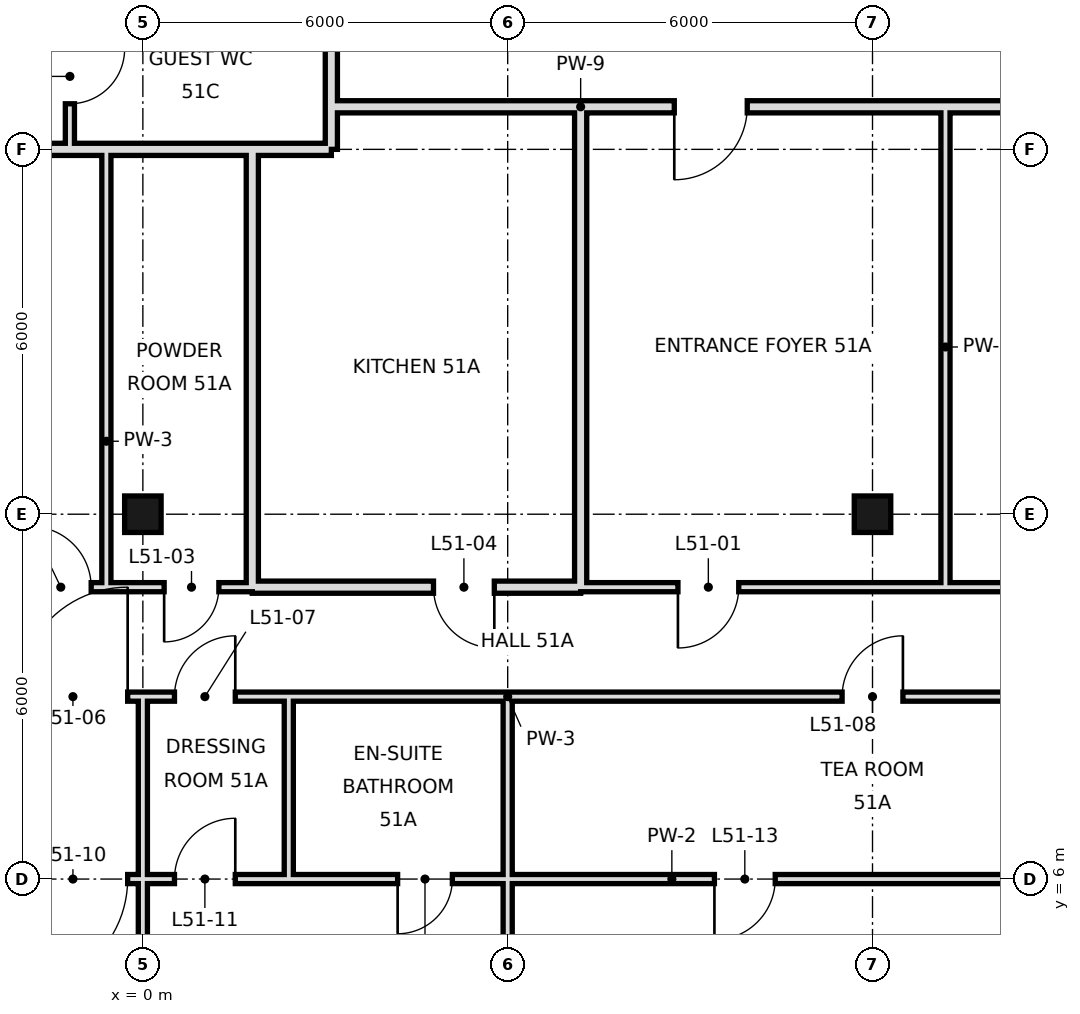
"""IFC4 building model, lengths in metres.
Left out: names, types, materials, properties, quantities, classifications, styles, units other than length and angle.
Written with IfcOpenShell. Run it as: python <this file> out.ifc"""

import sys

from ifc_helpers import new_model, si_unit, direction, frame, frame_2d, origin, origin_2d, place, context, subcontext, project, spatial, rectangle, hollow_rectangle, extrude, element, fill, save


model = new_model("IFC4")
c1 = context("Model", 3, precision=1e-05, world=origin(), true_north=direction((0.0, 1.0)))
c2 = subcontext(c1, "Body", "Model", "MODEL_VIEW")
j1 = project(units=[si_unit("LENGTHUNIT", "METRE"), si_unit("PLANEANGLEUNIT", "RADIAN")], contexts=[c1])
p1 = place(None, origin())
s1 = spatial("IfcSite", under=j1, at=p1, CompositionType="ELEMENT")
p2 = place(p1, origin())
s2 = spatial("IfcBuilding", under=s1, at=p2, CompositionType="ELEMENT")
p3 = place(p2, frame((0.0, 0.0, 219.0)))
s3 = spatial("IfcBuildingStorey", under=s2, at=p3, CompositionType="ELEMENT", Elevation=219.0)
for number, where, z_axis, x_axis in (
    (1, (0.0, 12.0, 0.0), (0.0, 0.0, 1.0), (1.0, 0.0, 0.0)),
    (2, (12.0, 12.0, 0.0), (0.0, 0.0, 1.0), (1.0, 0.0, 0.0)),
):
    element("IfcColumn", number, at=place(p3, frame(where, z_axis=z_axis, x_axis=x_axis)), inside=s3, PredefinedType="COLUMN", context=c2, shape_type="SweptSolid", body=[
        extrude(hollow_rectangle(XDim=0.6, YDim=0.6, WallThickness=0.028, at=origin_2d()), origin(), (0.0, 0.0, 1.0), 3.6),
    ])
p4 = place(p3, frame((-0.6, 10.8, 0.0), z_axis=(0.0, 0.0, 1.0), x_axis=(0.0, 1.0, 0.0)))
e3 = element("IfcWall", 3, at=p4, inside=s3, PredefinedType="PARTITIONING", context=c2, shape_type="SweptSolid", body=[
    extrude(rectangle(XDim=7.2, YDim=0.15, at=frame_2d((3.6, 0.0))), origin(), (0.0, 0.0, 1.0), 3.42),
])
p5 = place(p3, frame((-1.2, 18.0, 0.0), z_axis=(0.0, 0.0, 1.0), x_axis=(0.0, 1.0, 0.0)))
e4 = element("IfcWall", 4, at=p5, inside=s3, PredefinedType="PARTITIONING", context=c2, shape_type="SweptSolid", body=[
    extrude(rectangle(XDim=2.4, YDim=0.15, at=frame_2d((1.2, 0.0))), origin(), (0.0, 0.0, 1.0), 3.42),
])
p6 = place(p5, frame((0.75, 0.0, 0.0)))
e5 = element("IfcOpeningElement", 5, at=p6, cuts=e4, PredefinedType="OPENING", context=c2, shape_type="SweptSolid", body=[
    extrude(rectangle(XDim=0.9, YDim=2.4, at=frame_2d((0.45, 1.2))), frame((0.0, 0.085, 0.0), z_axis=(0.0, -1.0, 0.0), x_axis=(1.0, 0.0, 0.0)), (0.0, 0.0, 1.0), 0.17),
])
p7 = place(p3, frame((0.0, 0.0, 0.0), z_axis=(0.0, 0.0, 1.0), x_axis=(0.0, 1.0, 0.0)))
e6 = element("IfcWall", 6, at=p7, inside=s3, PredefinedType="PARTITIONING", context=c2, shape_type="SweptSolid", body=[
    extrude(rectangle(XDim=9.0, YDim=0.15, at=frame_2d((4.5, 0.0))), origin(), (0.0, 0.0, 1.0), 2.72),
])
p8 = place(p3, frame((1.8, 10.8, 0.0), z_axis=(0.0, 0.0, 1.0), x_axis=(0.0, 1.0, 0.0)))
e7 = element("IfcWall", 7, at=p8, inside=s3, PredefinedType="SOLIDWALL", context=c2, shape_type="SweptSolid", body=[
    extrude(rectangle(XDim=7.2, YDim=0.2, at=frame_2d((3.6, 0.0))), origin(), (0.0, 0.0, 1.0), 3.42),
])
p9 = place(p3, frame((13.2, 10.8, 0.0), z_axis=(0.0, 0.0, 1.0), x_axis=(0.0, 1.0, 0.0)))
e8 = element("IfcWall", 8, at=p9, inside=s3, PredefinedType="PARTITIONING", context=c2, shape_type="SweptSolid", body=[
    extrude(rectangle(XDim=7.9, YDim=0.15, at=frame_2d((3.95, 0.0))), origin(), (0.0, 0.0, 1.0), 3.42),
])
p10 = place(p3, frame((2.4, 6.0, 0.0), z_axis=(0.0, 0.0, 1.0), x_axis=(0.0, 1.0, 0.0)))
e9 = element("IfcWall", 9, at=p10, inside=s3, PredefinedType="PARTITIONING", context=c2, shape_type="SweptSolid", body=[
    extrude(rectangle(XDim=3.0, YDim=0.15, at=frame_2d((1.5, 0.0))), origin(), (0.0, 0.0, 1.0), 3.42),
])
p11 = place(p3, frame((3.1, 18.7, 0.0), z_axis=(0.0, 0.0, 1.0), x_axis=(0.0, 1.0, 0.0)))
e10 = element("IfcWall", 10, at=p11, inside=s3, PredefinedType="SOLIDWALL", context=c2, shape_type="SweptSolid", body=[
    extrude(rectangle(XDim=15.5, YDim=0.2, at=frame_2d((7.75, 0.0))), origin(), (0.0, 0.0, 1.0), 2.97),
])
p12 = place(p11, frame((4.96, 0.0, 0.0)))
e11 = element("IfcOpeningElement", 11, at=p12, cuts=e10, PredefinedType="OPENING", context=c2, shape_type="SweptSolid", body=[
    extrude(rectangle(XDim=1.2, YDim=2.4, at=frame_2d((0.6, 1.2))), frame((0.0, 0.11, 0.0), z_axis=(0.0, -1.0, 0.0), x_axis=(1.0, 0.0, 0.0)), (0.0, 0.0, 1.0), 0.22),
])
p13 = place(p3, frame((3.1, 18.0, 0.0), z_axis=(0.0, 0.0, 1.0), x_axis=(0.0, 1.0, 0.0)))
e12 = element("IfcWall", 12, at=p13, inside=s3, PredefinedType="SOLIDWALL", context=c2, shape_type="SweptSolid", body=[
    extrude(rectangle(XDim=0.7, YDim=0.2, at=frame_2d((0.35, 0.0))), origin(), (0.0, 0.0, 1.0), 2.97),
])
p14 = place(p3, frame((6.0, -0.6, 0.0), z_axis=(0.0, 0.0, 1.0), x_axis=(0.0, 1.0, 0.0)))
e13 = element("IfcWall", 13, at=p14, inside=s3, PredefinedType="PARTITIONING", context=c2, shape_type="SweptSolid", body=[
    extrude(rectangle(XDim=6.6, YDim=0.15, at=frame_2d((3.3, 0.0))), origin(), (0.0, 0.0, 1.0), 2.72),
])
p15 = place(p3, frame((6.0, 6.0, 0.0), z_axis=(0.0, 0.0, 1.0), x_axis=(0.0, 1.0, 0.0)))
e14 = element("IfcWall", 14, at=p15, inside=s3, PredefinedType="PARTITIONING", context=c2, shape_type="SweptSolid", body=[
    extrude(rectangle(XDim=3.0, YDim=0.15, at=frame_2d((1.5, 0.0))), origin(), (0.0, 0.0, 1.0), 2.72),
])
p16 = place(p3, frame((7.2, 10.8, 0.0), z_axis=(0.0, 0.0, 1.0), x_axis=(0.0, 1.0, 0.0)))
e15 = element("IfcWall", 15, at=p16, inside=s3, PredefinedType="SOLIDWALL", context=c2, shape_type="SweptSolid", body=[
    extrude(rectangle(XDim=7.9, YDim=0.2, at=frame_2d((3.95, 0.0))), origin(), (0.0, 0.0, 1.0), 2.72),
])
p17 = place(p3, frame((1.8, 10.8, 0.0), z_axis=(0.0, 0.0, 1.0), x_axis=(1.0, 0.0, 0.0)))
e16 = element("IfcWall", 16, at=p17, inside=s3, PredefinedType="SOLIDWALL", context=c2, shape_type="SweptSolid", body=[
    extrude(rectangle(XDim=5.4, YDim=0.2, at=frame_2d((2.7, 0.0))), origin(), (0.0, 0.0, 1.0), 2.72),
])
p18 = place(p17, frame((2.98, 0.0, 0.0)))
e17 = element("IfcOpeningElement", 17, at=p18, cuts=e16, PredefinedType="OPENING", context=c2, shape_type="SweptSolid", body=[
    extrude(rectangle(XDim=1.0, YDim=2.4, at=frame_2d((0.5, 1.2))), frame((0.0, 0.11, 0.0), z_axis=(0.0, -1.0, 0.0), x_axis=(1.0, 0.0, 0.0)), (0.0, 0.0, 1.0), 0.22),
])
p19 = place(p3, frame((-12.6, 10.8, 0.0), z_axis=(0.0, 0.0, 1.0), x_axis=(1.0, 0.0, 0.0)))
e18 = element("IfcWall", 18, at=p19, inside=s3, PredefinedType="PARTITIONING", context=c2, shape_type="SweptSolid", body=[
    extrude(rectangle(XDim=12.0, YDim=0.15, at=frame_2d((6.0, 0.0))), origin(), (0.0, 0.0, 1.0), 3.42),
])
p20 = place(p19, frame((10.75, 0.0, 0.0)))
e19 = element("IfcOpeningElement", 19, at=p20, cuts=e18, PredefinedType="OPENING", context=c2, shape_type="SweptSolid", body=[
    extrude(rectangle(XDim=1.0, YDim=2.4, at=frame_2d((0.5, 1.2))), frame((0.0, 0.085, 0.0), z_axis=(0.0, -1.0, 0.0), x_axis=(1.0, 0.0, 0.0)), (0.0, 0.0, 1.0), 0.17),
])
p21 = place(p3, frame((7.2, 10.8, 0.0), z_axis=(0.0, 0.0, 1.0), x_axis=(1.0, 0.0, 0.0)))
e20 = element("IfcWall", 20, at=p21, inside=s3, PredefinedType="PARTITIONING", context=c2, shape_type="SweptSolid", body=[
    extrude(rectangle(XDim=24.6, YDim=0.15, at=frame_2d((12.3, 0.0))), origin(), (0.0, 0.0, 1.0), 3.42),
])
p22 = place(p21, frame((1.6, 0.0, 0.0)))
e21 = element("IfcOpeningElement", 21, at=p22, cuts=e20, PredefinedType="OPENING", context=c2, shape_type="SweptSolid", body=[
    extrude(rectangle(XDim=1.0, YDim=2.4, at=frame_2d((0.5, 1.2))), frame((0.0, 0.085, 0.0), z_axis=(0.0, -1.0, 0.0), x_axis=(1.0, 0.0, 0.0)), (0.0, 0.0, 1.0), 0.17),
])
p23 = place(p21, frame((9.04, 0.0, 0.0)))
e22 = element("IfcOpeningElement", 22, at=p23, cuts=e20, PredefinedType="OPENING", context=c2, shape_type="SweptSolid", body=[
    extrude(rectangle(XDim=1.0, YDim=2.4, at=frame_2d((0.5, 1.2))), frame((0.0, 0.085, 0.0), z_axis=(0.0, -1.0, 0.0), x_axis=(1.0, 0.0, 0.0)), (0.0, 0.0, 1.0), 0.17),
])
p24 = place(p21, frame((21.46, 0.0, 0.0)))
e23 = element("IfcOpeningElement", 23, at=p24, cuts=e20, PredefinedType="OPENING", context=c2, shape_type="SweptSolid", body=[
    extrude(rectangle(XDim=1.0, YDim=2.4, at=frame_2d((0.5, 1.2))), frame((0.0, 0.085, 0.0), z_axis=(0.0, -1.0, 0.0), x_axis=(1.0, 0.0, 0.0)), (0.0, 0.0, 1.0), 0.17),
])
p25 = place(p3, frame((-0.6, 10.8, 0.0), z_axis=(0.0, 0.0, 1.0), x_axis=(1.0, 0.0, 0.0)))
e24 = element("IfcWall", 24, at=p25, inside=s3, PredefinedType="PARTITIONING", context=c2, shape_type="SweptSolid", body=[
    extrude(rectangle(XDim=2.4, YDim=0.15, at=frame_2d((1.2, 0.0))), origin(), (0.0, 0.0, 1.0), 3.42),
])
p26 = place(p25, frame((0.95, 0.0, 0.0)))
e25 = element("IfcOpeningElement", 25, at=p26, cuts=e24, PredefinedType="OPENING", context=c2, shape_type="SweptSolid", body=[
    extrude(rectangle(XDim=0.9, YDim=2.4, at=frame_2d((0.45, 1.2))), frame((0.0, 0.085, 0.0), z_axis=(0.0, -1.0, 0.0), x_axis=(1.0, 0.0, 0.0)), (0.0, 0.0, 1.0), 0.17),
])
p27 = place(p3, frame((1.8, 18.0, 0.0), z_axis=(0.0, 0.0, 1.0), x_axis=(1.0, 0.0, 0.0)))
e26 = element("IfcWall", 26, at=p27, inside=s3, PredefinedType="SOLIDWALL", context=c2, shape_type="SweptSolid", body=[
    extrude(rectangle(XDim=1.3, YDim=0.2, at=frame_2d((0.65, 0.0))), origin(), (0.0, 0.0, 1.0), 2.97),
])
p28 = place(p3, frame((-12.6, 18.0, 0.0), z_axis=(0.0, 0.0, 1.0), x_axis=(1.0, 0.0, 0.0)))
e27 = element("IfcWall", 27, at=p28, inside=s3, PredefinedType="SOLIDWALL", context=c2, shape_type="SweptSolid", body=[
    extrude(rectangle(XDim=14.4, YDim=0.2, at=frame_2d((7.2, 0.0))), origin(), (0.0, 0.0, 1.0), 2.72),
])
p29 = place(p3, frame((7.2, 18.7, 0.0), z_axis=(0.0, 0.0, 1.0), x_axis=(1.0, 0.0, 0.0)))
e28 = element("IfcWall", 28, at=p29, inside=s3, PredefinedType="SOLIDWALL", context=c2, shape_type="SweptSolid", body=[
    extrude(rectangle(XDim=37.7, YDim=0.2, at=frame_2d((18.85, 0.0))), origin(), (0.0, 0.0, 1.0), 2.72),
])
p30 = place(p29, frame((1.54, 0.0, 0.0)))
e29 = element("IfcOpeningElement", 29, at=p30, cuts=e28, PredefinedType="OPENING", context=c2, shape_type="SweptSolid", body=[
    extrude(rectangle(XDim=1.2, YDim=2.4, at=frame_2d((0.6, 1.2))), frame((0.0, 0.11, 0.0), z_axis=(0.0, -1.0, 0.0), x_axis=(1.0, 0.0, 0.0)), (0.0, 0.0, 1.0), 0.22),
])
p31 = place(p29, frame((30.26, 0.0, 0.0)))
e30 = element("IfcOpeningElement", 30, at=p31, cuts=e28, PredefinedType="OPENING", context=c2, shape_type="SweptSolid", body=[
    extrude(rectangle(XDim=1.2, YDim=2.4, at=frame_2d((0.6, 1.2))), frame((0.0, 0.11, 0.0), z_axis=(0.0, -1.0, 0.0), x_axis=(1.0, 0.0, 0.0)), (0.0, 0.0, 1.0), 0.22),
])
p32 = place(p3, frame((3.1, 18.7, 0.0), z_axis=(0.0, 0.0, 1.0), x_axis=(1.0, 0.0, 0.0)))
e31 = element("IfcWall", 31, at=p32, inside=s3, PredefinedType="SOLIDWALL", context=c2, shape_type="SweptSolid", body=[
    extrude(rectangle(XDim=4.1, YDim=0.2, at=frame_2d((2.05, 0.0))), origin(), (0.0, 0.0, 1.0), 2.72),
])
p33 = place(p3, frame((-12.0, 6.0, 0.0), z_axis=(0.0, 0.0, 1.0), x_axis=(1.0, 0.0, 0.0)))
e32 = element("IfcWall", 32, at=p33, inside=s3, PredefinedType="PARTITIONING", context=c2, shape_type="SweptSolid", body=[
    extrude(rectangle(XDim=14.4, YDim=0.15, at=frame_2d((7.2, 0.0))), origin(), (0.0, 0.0, 1.0), 2.72),
])
p34 = place(p33, frame((9.95, 0.0, 0.0)))
e33 = element("IfcOpeningElement", 33, at=p34, cuts=e32, PredefinedType="OPENING", context=c2, shape_type="SweptSolid", body=[
    extrude(rectangle(XDim=1.8, YDim=2.4, at=frame_2d((0.9, 1.2))), frame((0.0, 0.085, 0.0), z_axis=(0.0, -1.0, 0.0), x_axis=(1.0, 0.0, 0.0)), (0.0, 0.0, 1.0), 0.17),
])
p35 = place(p33, frame((12.52, 0.0, 0.0)))
e34 = element("IfcOpeningElement", 34, at=p35, cuts=e32, PredefinedType="OPENING", context=c2, shape_type="SweptSolid", body=[
    extrude(rectangle(XDim=1.0, YDim=2.4, at=frame_2d((0.5, 1.2))), frame((0.0, 0.085, 0.0), z_axis=(0.0, -1.0, 0.0), x_axis=(1.0, 0.0, 0.0)), (0.0, 0.0, 1.0), 0.17),
])
p36 = place(p3, frame((6.0, 6.0, 0.0), z_axis=(0.0, 0.0, 1.0), x_axis=(1.0, 0.0, 0.0)))
e35 = element("IfcWall", 35, at=p36, inside=s3, PredefinedType="PARTITIONING", context=c2, shape_type="SweptSolid", body=[
    extrude(rectangle(XDim=12.0, YDim=0.15, at=frame_2d((6.0, 0.0))), origin(), (0.0, 0.0, 1.0), 2.97),
])
p37 = place(p36, frame((3.4, 0.0, 0.0)))
e36 = element("IfcOpeningElement", 36, at=p37, cuts=e35, PredefinedType="OPENING", context=c2, shape_type="SweptSolid", body=[
    extrude(rectangle(XDim=1.0, YDim=2.4, at=frame_2d((0.5, 1.2))), frame((0.0, 0.085, 0.0), z_axis=(0.0, -1.0, 0.0), x_axis=(1.0, 0.0, 0.0)), (0.0, 0.0, 1.0), 0.17),
])
p38 = place(p3, frame((2.4, 6.0, 0.0), z_axis=(0.0, 0.0, 1.0), x_axis=(1.0, 0.0, 0.0)))
e37 = element("IfcWall", 37, at=p38, inside=s3, PredefinedType="PARTITIONING", context=c2, shape_type="SweptSolid", body=[
    extrude(rectangle(XDim=3.6, YDim=0.15, at=frame_2d((1.8, 0.0))), origin(), (0.0, 0.0, 1.0), 2.97),
])
p39 = place(p38, frame((1.79, 0.0, 0.0)))
e38 = element("IfcOpeningElement", 38, at=p39, cuts=e37, PredefinedType="OPENING", context=c2, shape_type="SweptSolid", body=[
    extrude(rectangle(XDim=0.9, YDim=2.4, at=frame_2d((0.45, 1.2))), frame((0.0, 0.085, 0.0), z_axis=(0.0, -1.0, 0.0), x_axis=(1.0, 0.0, 0.0)), (0.0, 0.0, 1.0), 0.17),
])
p40 = place(p3, frame((-12.6, 9.0, 0.0), z_axis=(0.0, 0.0, 1.0), x_axis=(1.0, 0.0, 0.0)))
e39 = element("IfcWall", 39, at=p40, inside=s3, PredefinedType="PARTITIONING", context=c2, shape_type="SweptSolid", body=[
    extrude(rectangle(XDim=15.0, YDim=0.15, at=frame_2d((7.5, 0.0))), origin(), (0.0, 0.0, 1.0), 3.42),
])
p41 = place(p40, frame((10.55, 0.0, 0.0)))
e40 = element("IfcOpeningElement", 40, at=p41, cuts=e39, PredefinedType="OPENING", context=c2, shape_type="SweptSolid", body=[
    extrude(rectangle(XDim=1.8, YDim=2.4, at=frame_2d((0.9, 1.2))), frame((0.0, 0.085, 0.0), z_axis=(0.0, -1.0, 0.0), x_axis=(1.0, 0.0, 0.0)), (0.0, 0.0, 1.0), 0.17),
])
p42 = place(p40, frame((13.12, 0.0, 0.0)))
e41 = element("IfcOpeningElement", 41, at=p42, cuts=e39, PredefinedType="OPENING", context=c2, shape_type="SweptSolid", body=[
    extrude(rectangle(XDim=1.0, YDim=2.4, at=frame_2d((0.5, 1.2))), frame((0.0, 0.085, 0.0), z_axis=(0.0, -1.0, 0.0), x_axis=(1.0, 0.0, 0.0)), (0.0, 0.0, 1.0), 0.17),
])
p43 = place(p3, frame((6.0, 9.0, 0.0), z_axis=(0.0, 0.0, 1.0), x_axis=(1.0, 0.0, 0.0)))
e42 = element("IfcWall", 42, at=p43, inside=s3, PredefinedType="PARTITIONING", context=c2, shape_type="SweptSolid", body=[
    extrude(rectangle(XDim=18.0, YDim=0.15, at=frame_2d((9.0, 0.0))), origin(), (0.0, 0.0, 1.0), 3.42),
])
p44 = place(p43, frame((5.5, 0.0, 0.0)))
e43 = element("IfcOpeningElement", 43, at=p44, cuts=e42, PredefinedType="OPENING", context=c2, shape_type="SweptSolid", body=[
    extrude(rectangle(XDim=1.0, YDim=2.4, at=frame_2d((0.5, 1.2))), frame((0.0, 0.085, 0.0), z_axis=(0.0, -1.0, 0.0), x_axis=(1.0, 0.0, 0.0)), (0.0, 0.0, 1.0), 0.17),
])
p45 = place(p43, frame((13.6, 0.0, 0.0)))
e44 = element("IfcOpeningElement", 44, at=p45, cuts=e42, PredefinedType="OPENING", context=c2, shape_type="SweptSolid", body=[
    extrude(rectangle(XDim=1.0, YDim=2.4, at=frame_2d((0.5, 1.2))), frame((0.0, 0.085, 0.0), z_axis=(0.0, -1.0, 0.0), x_axis=(1.0, 0.0, 0.0)), (0.0, 0.0, 1.0), 0.17),
])
p46 = place(p3, frame((2.4, 9.0, 0.0), z_axis=(0.0, 0.0, 1.0), x_axis=(1.0, 0.0, 0.0)))
e45 = element("IfcWall", 45, at=p46, inside=s3, PredefinedType="PARTITIONING", context=c2, shape_type="SweptSolid", body=[
    extrude(rectangle(XDim=3.6, YDim=0.15, at=frame_2d((1.8, 0.0))), origin(), (0.0, 0.0, 1.0), 3.42),
])
p47 = place(p22, frame((1.0, 0.0, 0.0), z_axis=(0.0, 0.0, 1.0), x_axis=(-1.0, 0.0, 0.0)))
e46 = element("IfcDoor", 46, at=p47, inside=s3, OperationType="SINGLE_SWING_RIGHT", PredefinedType="DOOR", context=c2, shape_type="SweptSolid", body=[
    extrude(rectangle(XDim=1.0, YDim=2.4, at=frame_2d((0.5, 1.2))), frame((0.0, 0.025, 0.0), z_axis=(0.0, -1.0, 0.0), x_axis=(1.0, 0.0, 0.0)), (0.0, 0.0, 1.0), 0.05),
])
fill(e21, e46)
p48 = place(p20, origin())
e47 = element("IfcDoor", 47, at=p48, inside=s3, OperationType="SINGLE_SWING_LEFT", PredefinedType="DOOR", context=c2, shape_type="SweptSolid", body=[
    extrude(rectangle(XDim=1.0, YDim=2.4, at=frame_2d((0.5, 1.2))), frame((0.0, 0.025, 0.0), z_axis=(0.0, -1.0, 0.0), x_axis=(1.0, 0.0, 0.0)), (0.0, 0.0, 1.0), 0.05),
])
fill(e19, e47)
p49 = place(p26, frame((0.9, 0.0, 0.0), z_axis=(0.0, 0.0, 1.0), x_axis=(-1.0, 0.0, 0.0)))
e48 = element("IfcDoor", 48, at=p49, inside=s3, OperationType="SINGLE_SWING_RIGHT", PredefinedType="DOOR", context=c2, shape_type="SweptSolid", body=[
    extrude(rectangle(XDim=0.9, YDim=2.4, at=frame_2d((0.45, 1.2))), frame((0.0, 0.025, 0.0), z_axis=(0.0, -1.0, 0.0), x_axis=(1.0, 0.0, 0.0)), (0.0, 0.0, 1.0), 0.05),
])
fill(e25, e48)
p50 = place(p18, origin())
e49 = element("IfcDoor", 49, at=p50, inside=s3, OperationType="SINGLE_SWING_RIGHT", PredefinedType="DOOR", context=c2, shape_type="SweptSolid", body=[
    extrude(rectangle(XDim=1.0, YDim=2.4, at=frame_2d((0.5, 1.2))), frame((0.0, 0.025, 0.0), z_axis=(0.0, -1.0, 0.0), x_axis=(1.0, 0.0, 0.0)), (0.0, 0.0, 1.0), 0.05),
])
fill(e17, e49)
p51 = place(p41, frame((1.8, 0.0, 0.0), z_axis=(0.0, 0.0, 1.0), x_axis=(-1.0, 0.0, 0.0)))
e50 = element("IfcDoor", 50, at=p51, inside=s3, OperationType="SINGLE_SWING_LEFT", PredefinedType="DOOR", context=c2, shape_type="SweptSolid", body=[
    extrude(rectangle(XDim=1.8, YDim=2.4, at=frame_2d((0.9, 1.2))), frame((0.0, 0.025, 0.0), z_axis=(0.0, -1.0, 0.0), x_axis=(1.0, 0.0, 0.0)), (0.0, 0.0, 1.0), 0.05),
])
fill(e40, e50)
p52 = place(p42, frame((1.0, 0.0, 0.0), z_axis=(0.0, 0.0, 1.0), x_axis=(-1.0, 0.0, 0.0)))
e51 = element("IfcDoor", 51, at=p52, inside=s3, OperationType="SINGLE_SWING_LEFT", PredefinedType="DOOR", context=c2, shape_type="SweptSolid", body=[
    extrude(rectangle(XDim=1.0, YDim=2.4, at=frame_2d((0.5, 1.2))), frame((0.0, 0.025, 0.0), z_axis=(0.0, -1.0, 0.0), x_axis=(1.0, 0.0, 0.0)), (0.0, 0.0, 1.0), 0.05),
])
fill(e41, e51)
p53 = place(p44, frame((1.0, 0.0, 0.0), z_axis=(0.0, 0.0, 1.0), x_axis=(-1.0, 0.0, 0.0)))
e52 = element("IfcDoor", 52, at=p53, inside=s3, OperationType="SINGLE_SWING_LEFT", PredefinedType="DOOR", context=c2, shape_type="SweptSolid", body=[
    extrude(rectangle(XDim=1.0, YDim=2.4, at=frame_2d((0.5, 1.2))), frame((0.0, 0.025, 0.0), z_axis=(0.0, -1.0, 0.0), x_axis=(1.0, 0.0, 0.0)), (0.0, 0.0, 1.0), 0.05),
])
fill(e43, e52)
p54 = place(p34, frame((1.8, 0.0, 0.0), z_axis=(0.0, 0.0, 1.0), x_axis=(-1.0, 0.0, 0.0)))
e53 = element("IfcDoor", 53, at=p54, inside=s3, OperationType="SINGLE_SWING_RIGHT", PredefinedType="DOOR", context=c2, shape_type="SweptSolid", body=[
    extrude(rectangle(XDim=1.8, YDim=2.4, at=frame_2d((0.9, 1.2))), frame((0.0, 0.025, 0.0), z_axis=(0.0, -1.0, 0.0), x_axis=(1.0, 0.0, 0.0)), (0.0, 0.0, 1.0), 0.05),
])
fill(e33, e53)
p55 = place(p35, frame((1.0, 0.0, 0.0), z_axis=(0.0, 0.0, 1.0), x_axis=(-1.0, 0.0, 0.0)))
e54 = element("IfcDoor", 54, at=p55, inside=s3, OperationType="SINGLE_SWING_LEFT", PredefinedType="DOOR", context=c2, shape_type="SweptSolid", body=[
    extrude(rectangle(XDim=1.0, YDim=2.4, at=frame_2d((0.5, 1.2))), frame((0.0, 0.025, 0.0), z_axis=(0.0, -1.0, 0.0), x_axis=(1.0, 0.0, 0.0)), (0.0, 0.0, 1.0), 0.05),
])
fill(e34, e54)
p56 = place(p39, frame((0.9, 0.0, 0.0), z_axis=(0.0, 0.0, 1.0), x_axis=(-1.0, 0.0, 0.0)))
e55 = element("IfcDoor", 55, at=p56, inside=s3, OperationType="SINGLE_SWING_RIGHT", PredefinedType="DOOR", context=c2, shape_type="SweptSolid", body=[
    extrude(rectangle(XDim=0.9, YDim=2.4, at=frame_2d((0.45, 1.2))), frame((0.0, 0.025, 0.0), z_axis=(0.0, -1.0, 0.0), x_axis=(1.0, 0.0, 0.0)), (0.0, 0.0, 1.0), 0.05),
])
fill(e38, e55)
p57 = place(p37, frame((1.0, 0.0, 0.0), z_axis=(0.0, 0.0, 1.0), x_axis=(-1.0, 0.0, 0.0)))
e56 = element("IfcDoor", 56, at=p57, inside=s3, OperationType="SINGLE_SWING_RIGHT", PredefinedType="DOOR", context=c2, shape_type="SweptSolid", body=[
    extrude(rectangle(XDim=1.0, YDim=2.4, at=frame_2d((0.5, 1.2))), frame((0.0, 0.025, 0.0), z_axis=(0.0, -1.0, 0.0), x_axis=(1.0, 0.0, 0.0)), (0.0, 0.0, 1.0), 0.05),
])
fill(e36, e56)
p58 = place(p6, origin())
e57 = element("IfcDoor", 57, at=p58, inside=s3, OperationType="SINGLE_SWING_RIGHT", PredefinedType="DOOR", context=c2, shape_type="SweptSolid", body=[
    extrude(rectangle(XDim=0.9, YDim=2.4, at=frame_2d((0.45, 1.2))), frame((0.0, 0.025, 0.0), z_axis=(0.0, -1.0, 0.0), x_axis=(1.0, 0.0, 0.0)), (0.0, 0.0, 1.0), 0.05),
])
fill(e5, e57)
p59 = place(p30, frame((1.2, 0.0, 0.0), z_axis=(0.0, 0.0, 1.0), x_axis=(-1.0, 0.0, 0.0)))
e58 = element("IfcDoor", 58, at=p59, inside=s3, OperationType="SINGLE_SWING_RIGHT", PredefinedType="DOOR", context=c2, shape_type="SweptSolid", body=[
    extrude(rectangle(XDim=1.2, YDim=2.4, at=frame_2d((0.6, 1.2))), frame((0.0, 0.025, 0.0), z_axis=(0.0, -1.0, 0.0), x_axis=(1.0, 0.0, 0.0)), (0.0, 0.0, 1.0), 0.05),
])
fill(e29, e58)
save(model, sys.argv[1])
